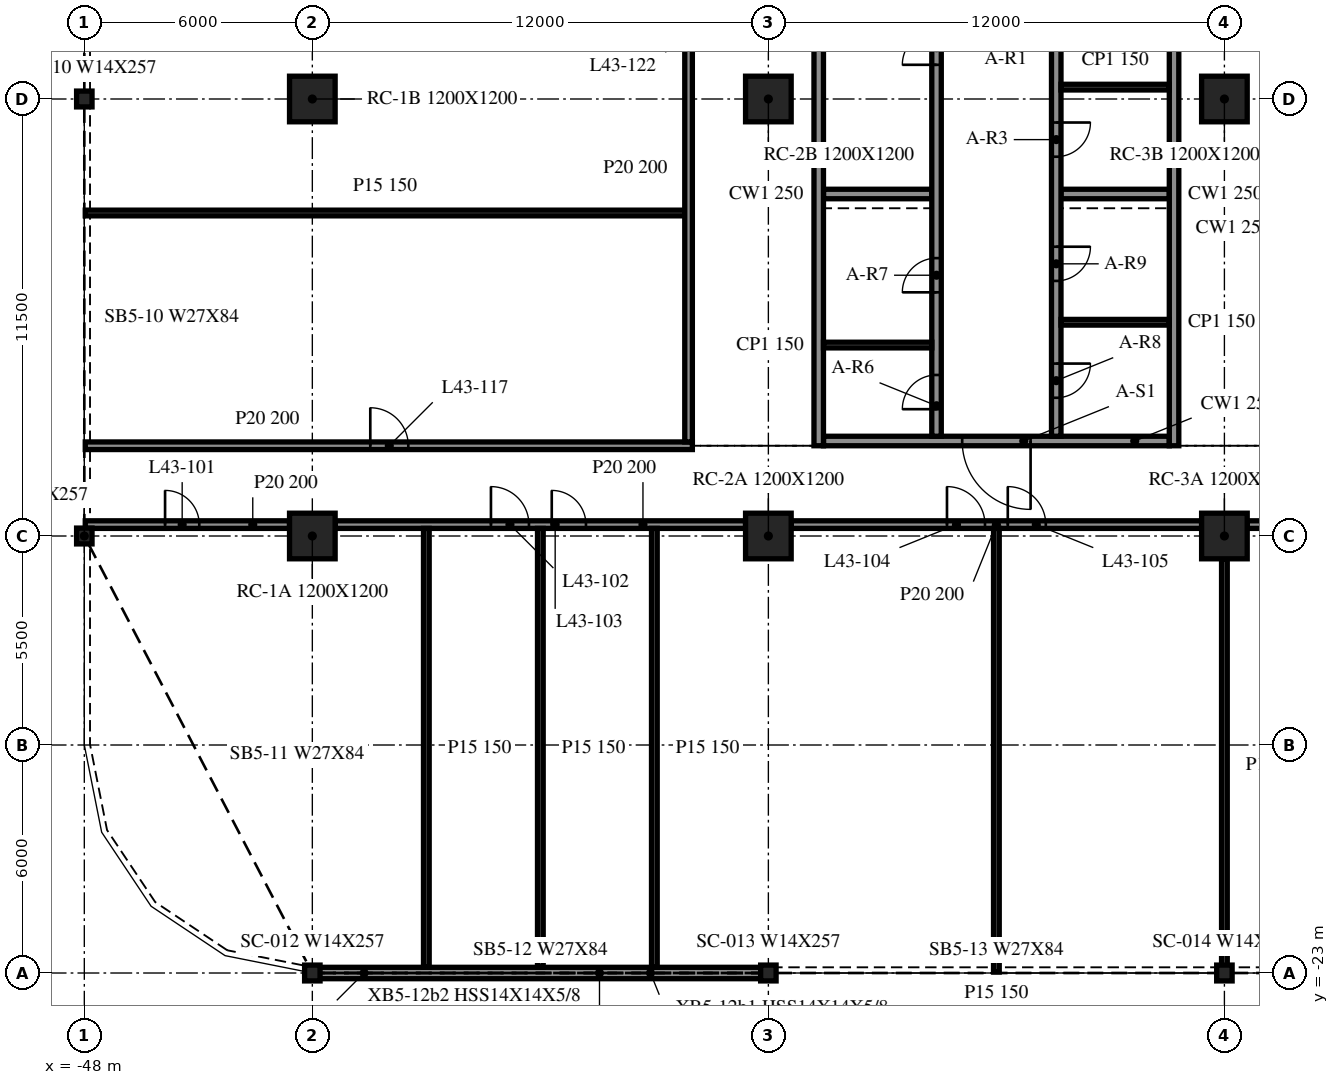
"""IFC4 building model, lengths in metres.
Left out: names, types, materials, properties, quantities, classifications, styles, units other than length and angle.
Written with IfcOpenShell. Run it as: python <this file> out.ifc"""

import sys

from ifc_helpers import new_model, si_unit, direction, frame, frame_2d, origin, origin_2d, place, context, subcontext, project, spatial, rectangle, i_section, extrude, element, fill, save


model = new_model("IFC4")
c1 = context("Model", 3, precision=1e-05, world=origin(), true_north=direction((0.0, 1.0)))
c2 = subcontext(c1, "Body", "Model", "MODEL_VIEW")
j1 = project(units=[si_unit("LENGTHUNIT", "METRE"), si_unit("PLANEANGLEUNIT", "RADIAN")], contexts=[c1])
p1 = place(None, origin())
s1 = spatial("IfcSite", under=j1, at=p1, CompositionType="ELEMENT")
p2 = place(p1, origin())
s2 = spatial("IfcBuilding", under=s1, at=p2, CompositionType="ELEMENT")
p3 = place(p2, frame((0.0, 0.0, 182.0)))
s3 = spatial("IfcBuildingStorey", under=s2, at=p3, CompositionType="ELEMENT", Elevation=182.0)
for number, where, z_axis, x_axis in (
    (1, (-42.0, -11.5, -0.34), (0.0, 0.0, 1.0), (1.0, 0.0, 0.0)),
    (2, (-42.0, 0.0, -0.34), (0.0, 0.0, 1.0), (1.0, 0.0, 0.0)),
    (3, (-30.0, -11.5, -0.34), (0.0, 0.0, 1.0), (1.0, 0.0, 0.0)),
    (4, (-30.0, 0.0, -0.34), (0.0, 0.0, 1.0), (1.0, 0.0, 0.0)),
    (5, (-18.0, -11.5, -0.34), (0.0, 0.0, 1.0), (1.0, 0.0, 0.0)),
    (6, (-18.0, 0.0, -0.34), (0.0, 0.0, 1.0), (1.0, 0.0, 0.0)),
):
    element("IfcColumn", number, at=place(p3, frame(where, z_axis=z_axis, x_axis=x_axis)), inside=s3, PredefinedType="COLUMN", context=c2, shape_type="SweptSolid", body=[
        extrude(rectangle(XDim=1.2, YDim=1.2, at=origin_2d()), origin(), (0.0, 0.0, 1.0), 3.8),
    ])
for number, where, z_axis, x_axis in (
    (7, (-48.0, 0.0, -0.34), (0.0, 0.0, 1.0), (1.0, 0.0, 0.0)),
    (8, (-48.0, -11.5, -0.34), (0.0, 0.0, 1.0), (1.0, 0.0, 0.0)),
    (9, (-42.0, -23.0, -0.34), (0.0, 0.0, 1.0), (1.0, 0.0, 0.0)),
    (10, (-30.0, -23.0, -0.34), (0.0, 0.0, 1.0), (1.0, 0.0, 0.0)),
    (11, (-18.0, -23.0, -0.34), (0.0, 0.0, 1.0), (1.0, 0.0, 0.0)),
):
    element("IfcColumn", number, at=place(p3, frame(where, z_axis=z_axis, x_axis=x_axis)), inside=s3, PredefinedType="COLUMN", context=c2, shape_type="SweptSolid", body=[
        extrude(i_section(OverallWidth=0.406, OverallDepth=0.417, WebThickness=0.03, FlangeThickness=0.048, at=origin_2d()), origin(), (0.0, 0.0, 1.0), 3.8),
    ])
p4 = place(p3, frame((-41.985, -23.0, 0.0), z_axis=(0.0, 0.0, 1.0), x_axis=(1.0, 0.0, 0.0)))
e12 = element("IfcWall", 12, at=p4, inside=s3, PredefinedType="NOTDEFINED", context=c2, shape_type="SweptSolid", body=[
    extrude(rectangle(XDim=11.97, YDim=0.3, at=frame_2d((5.985, 0.0))), origin(), (0.0, 0.0, 1.0), 2.782),
])
for number, where, z_axis, x_axis in (
    (13, (-28.675, 15.125, 0.0), (0.0, 0.0, 1.0), (0.0, -1.0, 0.0)),
    (14, (-19.325, -9.125, 0.0), (0.0, 0.0, 1.0), (0.0, 1.0, 0.0)),
):
    element("IfcWall", number, at=place(p3, frame(where, z_axis=z_axis, x_axis=x_axis)), inside=s3, PredefinedType="SOLIDWALL", context=c2, shape_type="SweptSolid", body=[
        extrude(rectangle(XDim=24.25, YDim=0.25, at=frame_2d((12.125, 0.0))), origin(), (0.0, 0.0, 1.0), 3.46),
    ])
p5 = place(p3, frame((-19.45, -9.0, 0.0), z_axis=(0.0, 0.0, 1.0), x_axis=(-1.0, 0.0, 0.0)))
e15 = element("IfcWall", 15, at=p5, inside=s3, PredefinedType="SOLIDWALL", context=c2, shape_type="SweptSolid", body=[
    extrude(rectangle(XDim=9.1, YDim=0.25, at=frame_2d((4.55, 0.0))), origin(), (0.0, 0.0, 1.0), 3.46),
])
p6 = place(p5, frame((3.65, 0.0, 0.0)))
e16 = element("IfcOpeningElement", 16, at=p6, cuts=e15, PredefinedType="OPENING", context=c2, shape_type="SweptSolid", body=[
    extrude(rectangle(XDim=1.8, YDim=2.1, at=frame_2d((0.9, 1.05))), frame((0.0, 0.135, 0.0), z_axis=(0.0, -1.0, 0.0), x_axis=(1.0, 0.0, 0.0)), (0.0, 0.0, 1.0), 0.27),
])
p7 = place(p3, frame((-25.575, -8.875, 0.0), z_axis=(0.0, 0.0, 1.0), x_axis=(0.0, 1.0, 0.0)))
e17 = element("IfcWall", 17, at=p7, inside=s3, PredefinedType="SOLIDWALL", context=c2, shape_type="SweptSolid", body=[
    extrude(rectangle(XDim=17.5, YDim=0.25, at=frame_2d((8.75, 0.0))), origin(), (0.0, 0.0, 1.0), 3.46),
])
p8 = place(p7, frame((9.775, 0.0, 0.0)))
e18 = element("IfcOpeningElement", 18, at=p8, cuts=e17, PredefinedType="OPENING", context=c2, shape_type="SweptSolid", body=[
    extrude(rectangle(XDim=0.9, YDim=2.1, at=frame_2d((0.45, 1.05))), frame((0.0, 0.135, 0.0), z_axis=(0.0, -1.0, 0.0), x_axis=(1.0, 0.0, 0.0)), (0.0, 0.0, 1.0), 0.27),
])
p9 = place(p7, frame((15.225, 0.0, 0.0)))
e19 = element("IfcOpeningElement", 19, at=p9, cuts=e17, PredefinedType="OPENING", context=c2, shape_type="SweptSolid", body=[
    extrude(rectangle(XDim=0.9, YDim=2.1, at=frame_2d((0.45, 1.05))), frame((0.0, 0.135, 0.0), z_axis=(0.0, -1.0, 0.0), x_axis=(1.0, 0.0, 0.0)), (0.0, 0.0, 1.0), 0.27),
])
p10 = place(p7, frame((0.712, 0.0, 0.0)))
e20 = element("IfcOpeningElement", 20, at=p10, cuts=e17, PredefinedType="OPENING", context=c2, shape_type="SweptSolid", body=[
    extrude(rectangle(XDim=0.9, YDim=2.1, at=frame_2d((0.45, 1.05))), frame((0.0, 0.135, 0.0), z_axis=(0.0, -1.0, 0.0), x_axis=(1.0, 0.0, 0.0)), (0.0, 0.0, 1.0), 0.27),
])
p11 = place(p7, frame((3.788, 0.0, 0.0)))
e21 = element("IfcOpeningElement", 21, at=p11, cuts=e17, PredefinedType="OPENING", context=c2, shape_type="SweptSolid", body=[
    extrude(rectangle(XDim=0.9, YDim=2.1, at=frame_2d((0.45, 1.05))), frame((0.0, 0.135, 0.0), z_axis=(0.0, -1.0, 0.0), x_axis=(1.0, 0.0, 0.0)), (0.0, 0.0, 1.0), 0.27),
])
p12 = place(p3, frame((-22.425, 14.875, 0.0), z_axis=(0.0, 0.0, 1.0), x_axis=(0.0, -1.0, 0.0)))
e22 = element("IfcWall", 22, at=p12, inside=s3, PredefinedType="SOLIDWALL", context=c2, shape_type="SweptSolid", body=[
    extrude(rectangle(XDim=23.75, YDim=0.25, at=frame_2d((11.875, 0.0))), origin(), (0.0, 0.0, 1.0), 3.46),
])
p13 = place(p12, frame((15.494, 0.0, 0.0)))
e23 = element("IfcOpeningElement", 23, at=p13, cuts=e22, PredefinedType="OPENING", context=c2, shape_type="SweptSolid", body=[
    extrude(rectangle(XDim=0.9, YDim=2.1, at=frame_2d((0.45, 1.05))), frame((0.0, 0.135, 0.0), z_axis=(0.0, -1.0, 0.0), x_axis=(1.0, 0.0, 0.0)), (0.0, 0.0, 1.0), 0.27),
])
p14 = place(p12, frame((11.425, 0.0, 0.0)))
e24 = element("IfcOpeningElement", 24, at=p14, cuts=e22, PredefinedType="OPENING", context=c2, shape_type="SweptSolid", body=[
    extrude(rectangle(XDim=0.9, YDim=2.1, at=frame_2d((0.45, 1.05))), frame((0.0, 0.135, 0.0), z_axis=(0.0, -1.0, 0.0), x_axis=(1.0, 0.0, 0.0)), (0.0, 0.0, 1.0), 0.27),
])
p15 = place(p12, frame((7.356, 0.0, 0.0)))
e25 = element("IfcOpeningElement", 25, at=p15, cuts=e22, PredefinedType="OPENING", context=c2, shape_type="SweptSolid", body=[
    extrude(rectangle(XDim=0.9, YDim=2.1, at=frame_2d((0.45, 1.05))), frame((0.0, 0.135, 0.0), z_axis=(0.0, -1.0, 0.0), x_axis=(1.0, 0.0, 0.0)), (0.0, 0.0, 1.0), 0.27),
])
p16 = place(p12, frame((21.837, 0.0, 0.0)))
e26 = element("IfcOpeningElement", 26, at=p16, cuts=e22, PredefinedType="OPENING", context=c2, shape_type="SweptSolid", body=[
    extrude(rectangle(XDim=0.9, YDim=2.1, at=frame_2d((0.45, 1.05))), frame((0.0, 0.135, 0.0), z_axis=(0.0, -1.0, 0.0), x_axis=(1.0, 0.0, 0.0)), (0.0, 0.0, 1.0), 0.27),
])
p17 = place(p12, frame((18.762, 0.0, 0.0)))
e27 = element("IfcOpeningElement", 27, at=p17, cuts=e22, PredefinedType="OPENING", context=c2, shape_type="SweptSolid", body=[
    extrude(rectangle(XDim=0.9, YDim=2.1, at=frame_2d((0.45, 1.05))), frame((0.0, 0.135, 0.0), z_axis=(0.0, -1.0, 0.0), x_axis=(1.0, 0.0, 0.0)), (0.0, 0.0, 1.0), 0.27),
])
p18 = place(p12, frame((4.587, 0.0, 0.0)))
e28 = element("IfcOpeningElement", 28, at=p18, cuts=e22, PredefinedType="OPENING", context=c2, shape_type="SweptSolid", body=[
    extrude(rectangle(XDim=0.9, YDim=2.1, at=frame_2d((0.45, 1.05))), frame((0.0, 0.135, 0.0), z_axis=(0.0, -1.0, 0.0), x_axis=(1.0, 0.0, 0.0)), (0.0, 0.0, 1.0), 0.27),
])
p19 = place(p12, frame((2.55, 0.0, 0.0)))
e29 = element("IfcOpeningElement", 29, at=p19, cuts=e22, PredefinedType="OPENING", context=c2, shape_type="SweptSolid", body=[
    extrude(rectangle(XDim=0.9, YDim=2.1, at=frame_2d((0.45, 1.05))), frame((0.0, 0.135, 0.0), z_axis=(0.0, -1.0, 0.0), x_axis=(1.0, 0.0, 0.0)), (0.0, 0.0, 1.0), 0.27),
])
p20 = place(p12, frame((0.512, 0.0, 0.0)))
e30 = element("IfcOpeningElement", 30, at=p20, cuts=e22, PredefinedType="OPENING", context=c2, shape_type="SweptSolid", body=[
    extrude(rectangle(XDim=0.9, YDim=2.1, at=frame_2d((0.45, 1.05))), frame((0.0, 0.135, 0.0), z_axis=(0.0, -1.0, 0.0), x_axis=(1.0, 0.0, 0.0)), (0.0, 0.0, 1.0), 0.27),
])
for number, where, z_axis, x_axis in (
    (31, (-28.55, -2.5, 0.0), (0.0, 0.0, 1.0), (1.0, 0.0, 0.0)),
    (32, (-22.3, -2.5, 0.0), (0.0, 0.0, 1.0), (1.0, 0.0, 0.0)),
):
    element("IfcWall", number, at=place(p3, frame(where, z_axis=z_axis, x_axis=x_axis)), inside=s3, PredefinedType="SOLIDWALL", context=c2, shape_type="SweptSolid", body=[
        extrude(rectangle(XDim=2.85, YDim=0.25, at=frame_2d((1.425, 0.0))), origin(), (0.0, 0.0, 1.0), 3.46),
    ])
for number, where, z_axis, x_axis in (
    (33, (-22.3, 0.312, 0.0), (0.0, 0.0, 1.0), (1.0, 0.0, 0.0)),
    (34, (-28.55, -6.475, 0.0), (0.0, 0.0, 1.0), (1.0, 0.0, 0.0)),
    (35, (-22.3, -5.875, 0.0), (0.0, 0.0, 1.0), (1.0, 0.0, 0.0)),
):
    element("IfcWall", number, at=place(p3, frame(where, z_axis=z_axis, x_axis=x_axis)), inside=s3, PredefinedType="PARTITIONING", context=c2, shape_type="SweptSolid", body=[
        extrude(rectangle(XDim=2.85, YDim=0.15, at=frame_2d((1.425, 0.0))), origin(), (0.0, 0.0, 1.0), 3.46),
    ])
p21 = place(p3, frame((-47.975, -11.2, 0.0), z_axis=(0.0, 0.0, 1.0), x_axis=(1.0, 0.0, 0.0)))
e36 = element("IfcWall", 36, at=p21, inside=s3, PredefinedType="PARTITIONING", context=c2, shape_type="SweptSolid", body=[
    extrude(rectangle(XDim=5.375, YDim=0.2, at=frame_2d((2.688, 0.0))), origin(), (0.0, 0.0, 1.0), 3.46),
])
p22 = place(p21, frame((2.1, 0.0, 0.0)))
e37 = element("IfcOpeningElement", 37, at=p22, cuts=e36, PredefinedType="OPENING", context=c2, shape_type="SweptSolid", body=[
    extrude(rectangle(XDim=0.9, YDim=2.1, at=frame_2d((0.45, 1.05))), frame((0.0, 0.11, 0.0), z_axis=(0.0, -1.0, 0.0), x_axis=(1.0, 0.0, 0.0)), (0.0, 0.0, 1.0), 0.22),
])
p23 = place(p3, frame((-41.4, -11.2, 0.0), z_axis=(0.0, 0.0, 1.0), x_axis=(1.0, 0.0, 0.0)))
e38 = element("IfcWall", 38, at=p23, inside=s3, PredefinedType="PARTITIONING", context=c2, shape_type="SweptSolid", body=[
    extrude(rectangle(XDim=10.8, YDim=0.2, at=frame_2d((5.4, 0.0))), origin(), (0.0, 0.0, 1.0), 3.46),
])
p24 = place(p23, frame((4.1, 0.0, 0.0)))
e39 = element("IfcOpeningElement", 39, at=p24, cuts=e38, PredefinedType="OPENING", context=c2, shape_type="SweptSolid", body=[
    extrude(rectangle(XDim=1.0, YDim=2.1, at=frame_2d((0.5, 1.05))), frame((0.0, 0.11, 0.0), z_axis=(0.0, -1.0, 0.0), x_axis=(1.0, 0.0, 0.0)), (0.0, 0.0, 1.0), 0.22),
])
p25 = place(p23, frame((5.7, 0.0, 0.0)))
e40 = element("IfcOpeningElement", 40, at=p25, cuts=e38, PredefinedType="OPENING", context=c2, shape_type="SweptSolid", body=[
    extrude(rectangle(XDim=0.9, YDim=2.1, at=frame_2d((0.45, 1.05))), frame((0.0, 0.11, 0.0), z_axis=(0.0, -1.0, 0.0), x_axis=(1.0, 0.0, 0.0)), (0.0, 0.0, 1.0), 0.22),
])
p26 = place(p3, frame((-29.4, -11.2, 0.0), z_axis=(0.0, 0.0, 1.0), x_axis=(1.0, 0.0, 0.0)))
e41 = element("IfcWall", 41, at=p26, inside=s3, PredefinedType="PARTITIONING", context=c2, shape_type="SweptSolid", body=[
    extrude(rectangle(XDim=10.8, YDim=0.2, at=frame_2d((5.4, 0.0))), origin(), (0.0, 0.0, 1.0), 3.46),
])
p27 = place(p26, frame((4.1, 0.0, 0.0)))
e42 = element("IfcOpeningElement", 42, at=p27, cuts=e41, PredefinedType="OPENING", context=c2, shape_type="SweptSolid", body=[
    extrude(rectangle(XDim=1.0, YDim=2.1, at=frame_2d((0.5, 1.05))), frame((0.0, 0.11, 0.0), z_axis=(0.0, -1.0, 0.0), x_axis=(1.0, 0.0, 0.0)), (0.0, 0.0, 1.0), 0.22),
])
p28 = place(p26, frame((5.7, 0.0, 0.0)))
e43 = element("IfcOpeningElement", 43, at=p28, cuts=e41, PredefinedType="OPENING", context=c2, shape_type="SweptSolid", body=[
    extrude(rectangle(XDim=1.0, YDim=2.1, at=frame_2d((0.5, 1.05))), frame((0.0, 0.11, 0.0), z_axis=(0.0, -1.0, 0.0), x_axis=(1.0, 0.0, 0.0)), (0.0, 0.0, 1.0), 0.22),
])
p29 = place(p3, frame((-17.4, -11.2, 0.0), z_axis=(0.0, 0.0, 1.0), x_axis=(1.0, 0.0, 0.0)))
e44 = element("IfcWall", 44, at=p29, inside=s3, PredefinedType="PARTITIONING", context=c2, shape_type="SweptSolid", body=[
    extrude(rectangle(XDim=10.8, YDim=0.2, at=frame_2d((5.4, 0.0))), origin(), (0.0, 0.0, 1.0), 3.46),
])
p30 = place(p29, frame((4.9, 0.0, 0.0)))
e45 = element("IfcOpeningElement", 45, at=p30, cuts=e44, PredefinedType="OPENING", context=c2, shape_type="SweptSolid", body=[
    extrude(rectangle(XDim=1.0, YDim=2.1, at=frame_2d((0.5, 1.05))), frame((0.0, 0.11, 0.0), z_axis=(0.0, -1.0, 0.0), x_axis=(1.0, 0.0, 0.0)), (0.0, 0.0, 1.0), 0.22),
])
p31 = place(p29, frame((8.7, 0.0, 0.0)))
e46 = element("IfcOpeningElement", 46, at=p31, cuts=e44, PredefinedType="OPENING", context=c2, shape_type="SweptSolid", body=[
    extrude(rectangle(XDim=0.9, YDim=2.1, at=frame_2d((0.45, 1.05))), frame((0.0, 0.11, 0.0), z_axis=(0.0, -1.0, 0.0), x_axis=(1.0, 0.0, 0.0)), (0.0, 0.0, 1.0), 0.22),
])
p32 = place(p3, frame((-47.975, -9.125, 0.0), z_axis=(0.0, 0.0, 1.0), x_axis=(1.0, 0.0, 0.0)))
e47 = element("IfcWall", 47, at=p32, inside=s3, PredefinedType="PARTITIONING", context=c2, shape_type="SweptSolid", body=[
    extrude(rectangle(XDim=15.975, YDim=0.2, at=frame_2d((7.988, 0.0))), origin(), (0.0, 0.0, 1.0), 3.46),
])
p33 = place(p32, frame((7.5, 0.0, 0.0)))
e48 = element("IfcOpeningElement", 48, at=p33, cuts=e47, PredefinedType="OPENING", context=c2, shape_type="SweptSolid", body=[
    extrude(rectangle(XDim=1.0, YDim=2.1, at=frame_2d((0.5, 1.05))), frame((0.0, 0.11, 0.0), z_axis=(0.0, -1.0, 0.0), x_axis=(1.0, 0.0, 0.0)), (0.0, 0.0, 1.0), 0.22),
])
p34 = place(p3, frame((-47.975, -3.0, 0.0), z_axis=(0.0, 0.0, 1.0), x_axis=(1.0, 0.0, 0.0)))
e49 = element("IfcWall", 49, at=p34, inside=s3, PredefinedType="PARTITIONING", context=c2, shape_type="SweptSolid", body=[
    extrude(rectangle(XDim=15.775, YDim=0.15, at=frame_2d((7.888, 0.0))), origin(), (0.0, 0.0, 1.0), 3.46),
])
for number, where, z_axis, x_axis in (
    (50, (-39.0, -22.85, 0.0), (0.0, 0.0, 1.0), (0.0, 1.0, 0.0)),
    (51, (-36.0, -22.85, 0.0), (0.0, 0.0, 1.0), (0.0, 1.0, 0.0)),
    (52, (-33.0, -22.85, 0.0), (0.0, 0.0, 1.0), (0.0, 1.0, 0.0)),
):
    element("IfcWall", number, at=place(p3, frame(where, z_axis=z_axis, x_axis=x_axis)), inside=s3, PredefinedType="PARTITIONING", context=c2, shape_type="SweptSolid", body=[
        extrude(rectangle(XDim=11.55, YDim=0.15, at=frame_2d((5.775, 0.0))), origin(), (0.0, 0.0, 1.0), 3.46),
    ])
p35 = place(p3, frame((-32.1, -9.025, 0.0), z_axis=(0.0, 0.0, 1.0), x_axis=(0.0, 1.0, 0.0)))
e53 = element("IfcWall", 53, at=p35, inside=s3, PredefinedType="PARTITIONING", context=c2, shape_type="SweptSolid", body=[
    extrude(rectangle(XDim=24.05, YDim=0.2, at=frame_2d((12.025, 0.0))), origin(), (0.0, 0.0, 1.0), 3.46),
])
p36 = place(p35, frame((11.5, 0.0, 0.0)))
e54 = element("IfcOpeningElement", 54, at=p36, cuts=e53, PredefinedType="OPENING", context=c2, shape_type="SweptSolid", body=[
    extrude(rectangle(XDim=1.0, YDim=2.1, at=frame_2d((0.5, 1.05))), frame((0.0, 0.11, 0.0), z_axis=(0.0, -1.0, 0.0), x_axis=(1.0, 0.0, 0.0)), (0.0, 0.0, 1.0), 0.22),
])
p37 = place(p3, frame((-24.0, -22.975, 0.0), z_axis=(0.0, 0.0, 1.0), x_axis=(0.0, 1.0, 0.0)))
e55 = element("IfcWall", 55, at=p37, inside=s3, PredefinedType="PARTITIONING", context=c2, shape_type="SweptSolid", body=[
    extrude(rectangle(XDim=11.675, YDim=0.15, at=frame_2d((5.837, 0.0))), origin(), (0.0, 0.0, 1.0), 3.46),
])
p38 = place(p3, frame((-18.0, -22.975, 0.0), z_axis=(0.0, 0.0, 1.0), x_axis=(0.0, 1.0, 0.0)))
e56 = element("IfcWall", 56, at=p38, inside=s3, PredefinedType="PARTITIONING", context=c2, shape_type="SweptSolid", body=[
    extrude(rectangle(XDim=10.875, YDim=0.15, at=frame_2d((5.438, 0.0))), origin(), (0.0, 0.0, 1.0), 3.46),
])
p39 = place(p6, origin())
e57 = element("IfcDoor", 57, at=p39, inside=s3, OperationType="DOUBLE_DOOR_SINGLE_SWING", PredefinedType="DOOR", context=c2, shape_type="SweptSolid", body=[
    extrude(rectangle(XDim=1.8, YDim=2.1, at=frame_2d((0.9, 1.05))), frame((0.0, 0.025, 0.0), z_axis=(0.0, -1.0, 0.0), x_axis=(1.0, 0.0, 0.0)), (0.0, 0.0, 1.0), 0.05),
])
fill(e16, e57)
p40 = place(p8, origin())
e58 = element("IfcDoor", 58, at=p40, inside=s3, OperationType="SINGLE_SWING_LEFT", PredefinedType="DOOR", context=c2, shape_type="SweptSolid", body=[
    extrude(rectangle(XDim=0.9, YDim=2.1, at=frame_2d((0.45, 1.05))), frame((0.0, 0.025, 0.0), z_axis=(0.0, -1.0, 0.0), x_axis=(1.0, 0.0, 0.0)), (0.0, 0.0, 1.0), 0.05),
])
fill(e18, e58)
p41 = place(p13, origin())
e59 = element("IfcDoor", 59, at=p41, inside=s3, OperationType="SINGLE_SWING_LEFT", PredefinedType="DOOR", context=c2, shape_type="SweptSolid", body=[
    extrude(rectangle(XDim=0.9, YDim=2.1, at=frame_2d((0.45, 1.05))), frame((0.0, 0.025, 0.0), z_axis=(0.0, -1.0, 0.0), x_axis=(1.0, 0.0, 0.0)), (0.0, 0.0, 1.0), 0.05),
])
fill(e23, e59)
p42 = place(p10, origin())
e60 = element("IfcDoor", 60, at=p42, inside=s3, OperationType="SINGLE_SWING_RIGHT", PredefinedType="DOOR", context=c2, shape_type="SweptSolid", body=[
    extrude(rectangle(XDim=0.9, YDim=2.1, at=frame_2d((0.45, 1.05))), frame((0.0, 0.025, 0.0), z_axis=(0.0, -1.0, 0.0), x_axis=(1.0, 0.0, 0.0)), (0.0, 0.0, 1.0), 0.05),
])
fill(e20, e60)
p43 = place(p11, origin())
e61 = element("IfcDoor", 61, at=p43, inside=s3, OperationType="SINGLE_SWING_LEFT", PredefinedType="DOOR", context=c2, shape_type="SweptSolid", body=[
    extrude(rectangle(XDim=0.9, YDim=2.1, at=frame_2d((0.45, 1.05))), frame((0.0, 0.025, 0.0), z_axis=(0.0, -1.0, 0.0), x_axis=(1.0, 0.0, 0.0)), (0.0, 0.0, 1.0), 0.05),
])
fill(e21, e61)
p44 = place(p16, origin())
e62 = element("IfcDoor", 62, at=p44, inside=s3, OperationType="SINGLE_SWING_RIGHT", PredefinedType="DOOR", context=c2, shape_type="SweptSolid", body=[
    extrude(rectangle(XDim=0.9, YDim=2.1, at=frame_2d((0.45, 1.05))), frame((0.0, 0.025, 0.0), z_axis=(0.0, -1.0, 0.0), x_axis=(1.0, 0.0, 0.0)), (0.0, 0.0, 1.0), 0.05),
])
fill(e26, e62)
p45 = place(p17, origin())
e63 = element("IfcDoor", 63, at=p45, inside=s3, OperationType="SINGLE_SWING_LEFT", PredefinedType="DOOR", context=c2, shape_type="SweptSolid", body=[
    extrude(rectangle(XDim=0.9, YDim=2.1, at=frame_2d((0.45, 1.05))), frame((0.0, 0.025, 0.0), z_axis=(0.0, -1.0, 0.0), x_axis=(1.0, 0.0, 0.0)), (0.0, 0.0, 1.0), 0.05),
])
fill(e27, e63)
p46 = place(p22, origin())
e64 = element("IfcDoor", 64, at=p46, inside=s3, OperationType="SINGLE_SWING_RIGHT", PredefinedType="DOOR", context=c2, shape_type="SweptSolid", body=[
    extrude(rectangle(XDim=0.9, YDim=2.1, at=frame_2d((0.45, 1.05))), frame((0.0, 0.025, 0.0), z_axis=(0.0, -1.0, 0.0), x_axis=(1.0, 0.0, 0.0)), (0.0, 0.0, 1.0), 0.05),
])
fill(e37, e64)
p47 = place(p24, origin())
e65 = element("IfcDoor", 65, at=p47, inside=s3, OperationType="SINGLE_SWING_RIGHT", PredefinedType="DOOR", context=c2, shape_type="SweptSolid", body=[
    extrude(rectangle(XDim=1.0, YDim=2.1, at=frame_2d((0.5, 1.05))), frame((0.0, 0.025, 0.0), z_axis=(0.0, -1.0, 0.0), x_axis=(1.0, 0.0, 0.0)), (0.0, 0.0, 1.0), 0.05),
])
fill(e39, e65)
p48 = place(p25, origin())
e66 = element("IfcDoor", 66, at=p48, inside=s3, OperationType="SINGLE_SWING_LEFT", PredefinedType="DOOR", context=c2, shape_type="SweptSolid", body=[
    extrude(rectangle(XDim=0.9, YDim=2.1, at=frame_2d((0.45, 1.05))), frame((0.0, 0.025, 0.0), z_axis=(0.0, -1.0, 0.0), x_axis=(1.0, 0.0, 0.0)), (0.0, 0.0, 1.0), 0.05),
])
fill(e40, e66)
p49 = place(p27, origin())
e67 = element("IfcDoor", 67, at=p49, inside=s3, OperationType="SINGLE_SWING_RIGHT", PredefinedType="DOOR", context=c2, shape_type="SweptSolid", body=[
    extrude(rectangle(XDim=1.0, YDim=2.1, at=frame_2d((0.5, 1.05))), frame((0.0, 0.025, 0.0), z_axis=(0.0, -1.0, 0.0), x_axis=(1.0, 0.0, 0.0)), (0.0, 0.0, 1.0), 0.05),
])
fill(e42, e67)
p50 = place(p28, origin())
e68 = element("IfcDoor", 68, at=p50, inside=s3, OperationType="SINGLE_SWING_LEFT", PredefinedType="DOOR", context=c2, shape_type="SweptSolid", body=[
    extrude(rectangle(XDim=1.0, YDim=2.1, at=frame_2d((0.5, 1.05))), frame((0.0, 0.025, 0.0), z_axis=(0.0, -1.0, 0.0), x_axis=(1.0, 0.0, 0.0)), (0.0, 0.0, 1.0), 0.05),
])
fill(e43, e68)
p51 = place(p33, origin())
e69 = element("IfcDoor", 69, at=p51, inside=s3, OperationType="SINGLE_SWING_RIGHT", PredefinedType="DOOR", context=c2, shape_type="SweptSolid", body=[
    extrude(rectangle(XDim=1.0, YDim=2.1, at=frame_2d((0.5, 1.05))), frame((0.0, 0.025, 0.0), z_axis=(0.0, -1.0, 0.0), x_axis=(1.0, 0.0, 0.0)), (0.0, 0.0, 1.0), 0.05),
])
fill(e48, e69)
save(model, sys.argv[1])
